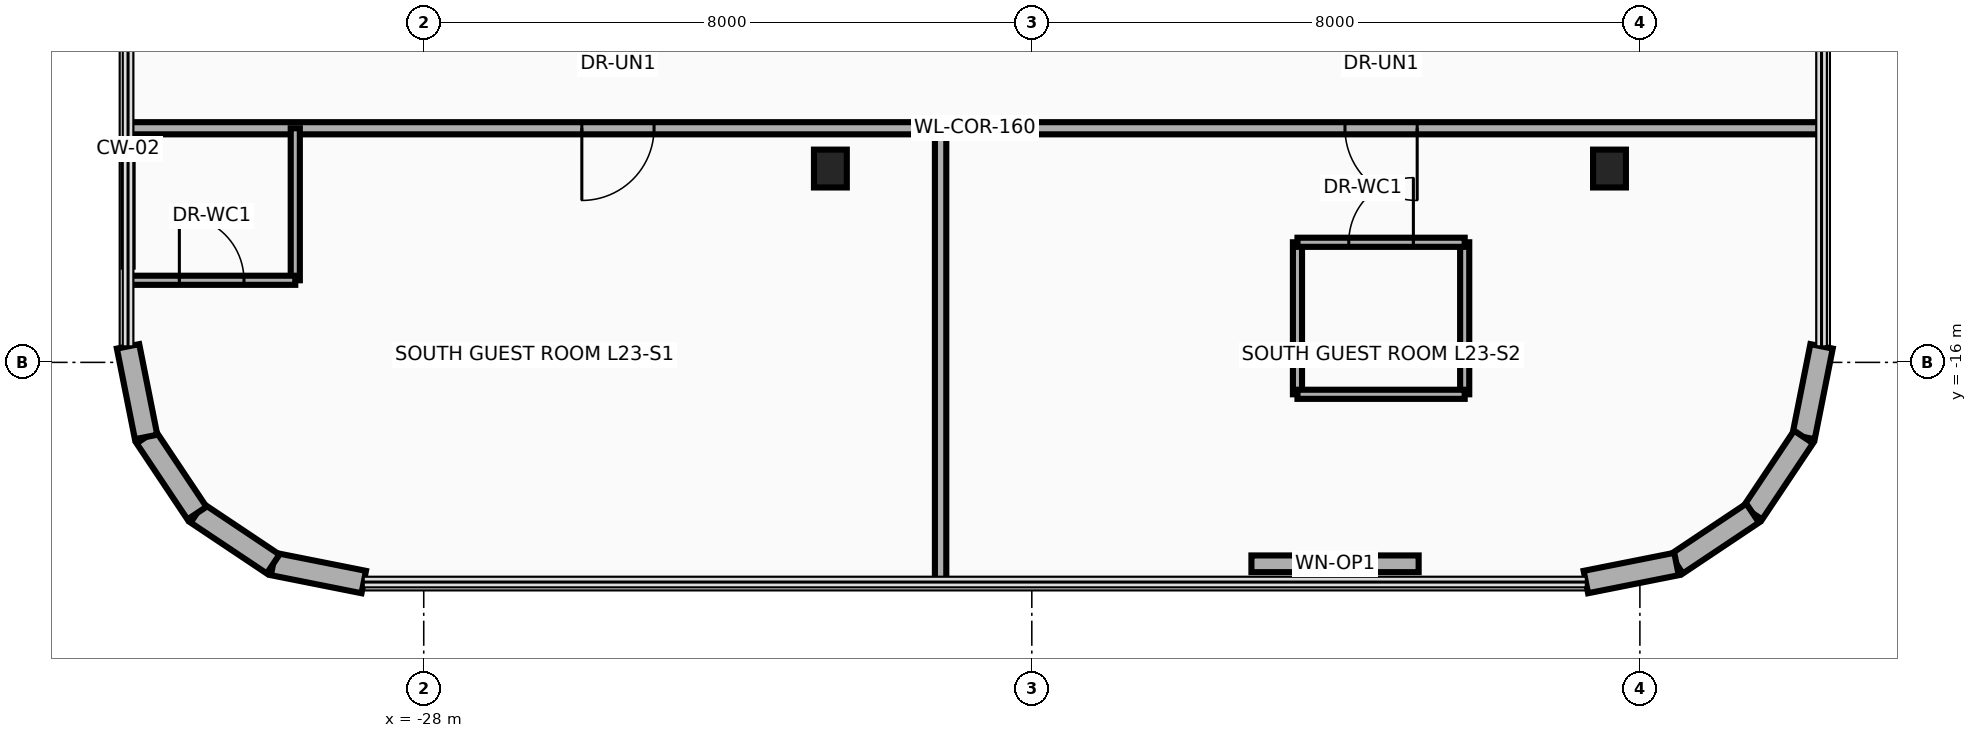
"""IFC4 building model, lengths in metres.
Left out: names, types, materials, properties, quantities, classifications, styles, units other than length and angle.
Written with IfcOpenShell. Run it as: python <this file> out.ifc"""

import sys

from ifc_helpers import new_model, si_unit, direction, frame, frame_2d, origin, origin_2d, place, context, subcontext, project, spatial, rectangle, i_section, extrude, source, transform, mapped, element, fill, save


model = new_model("IFC4")
c1 = context("Model", 3, precision=1e-05, world=origin(), true_north=direction((0.0, 1.0)))
c2 = subcontext(c1, "Body", "Model", "MODEL_VIEW")
j1 = project(units=[si_unit("LENGTHUNIT", "METRE"), si_unit("PLANEANGLEUNIT", "RADIAN")], contexts=[c1])
p1 = place(None, origin())
s1 = spatial("IfcSite", under=j1, at=p1, CompositionType="ELEMENT")
p2 = place(p1, origin())
s2 = spatial("IfcBuilding", under=s1, at=p2, CompositionType="ELEMENT")
p3 = place(p2, frame((0.0, 0.0, 92.6)))
s3 = spatial("IfcBuildingStorey", under=s2, at=p3, CompositionType="ELEMENT", Elevation=92.6)
m1 = source(origin(), c2, "Body", "SweptSolid", [
    extrude(i_section(OverallWidth=0.432, OverallDepth=0.498, WebThickness=0.056, FlangeThickness=0.089, at=origin_2d()), origin(), (0.0, 0.0, 1.0), 3.7),
])
for number, where, z_axis, x_axis in (
    (1, (-22.65, -13.45, 0.0), (0.0, 0.0, 1.0), (1.0, 0.0, 0.0)),
    (2, (-12.4, -13.45, 0.0), (0.0, 0.0, 1.0), (1.0, 0.0, 0.0)),
):
    element("IfcColumn", number, at=place(p3, frame(where, z_axis=z_axis, x_axis=x_axis)), inside=s3, PredefinedType="COLUMN", context=c2, shape_type="MappedRepresentation", body=[
        mapped(m1, transform((0.0, 0.0, 0.0), x_axis=(1.0, 0.0, 0.0), y_axis=(0.0, 1.0, 0.0), z_axis=(0.0, 0.0, 1.0), scale=1.0)),
    ])
p4 = place(p3, frame((-9.61, -15.789, 0.0), z_axis=(0.0, 0.0, 1.0), x_axis=(-0.194996050505, -0.980804027463, 0.0)))
e3 = element("IfcWall", 3, at=p4, inside=s3, PredefinedType="SOLIDWALL", context=c2, shape_type="SweptSolid", body=[
    extrude(rectangle(XDim=1.216, YDim=0.3, at=frame_2d((0.608, 0.0))), origin(), (0.0, 0.0, 1.0), 3.46),
])
for number, where, z_axis, x_axis in (
    (4, (-9.847, -16.982, 0.0), (0.0, 0.0, 1.0), (-0.556, -0.831, 0.0)),
    (5, (-10.517, -17.983, 0.0), (0.0, 0.0, 1.0), (-0.831, -0.556, 0.0)),
):
    element("IfcWall", number, at=place(p3, frame(where, z_axis=z_axis, x_axis=x_axis)), inside=s3, PredefinedType="SOLIDWALL", context=c2, shape_type="SweptSolid", body=[
        extrude(rectangle(XDim=1.205, YDim=0.3, at=frame_2d((0.603, 0.0))), origin(), (0.0, 0.0, 1.0), 3.46),
    ])
p5 = place(p3, frame((-11.518, -18.653, 0.0), z_axis=(0.0, 0.0, 1.0), x_axis=(-0.980804027463, -0.194996050505, 0.0)))
e6 = element("IfcWall", 6, at=p5, inside=s3, PredefinedType="SOLIDWALL", context=c2, shape_type="SweptSolid", body=[
    extrude(rectangle(XDim=1.216, YDim=0.3, at=frame_2d((0.608, 0.0))), origin(), (0.0, 0.0, 1.0), 3.46),
])
p6 = place(p3, frame((-14.911, -18.65, 0.0), z_axis=(0.0, 0.0, 1.0), x_axis=(-1.0, 0.0, 0.0)))
e7 = element("IfcWall", 7, at=p6, inside=s3, PredefinedType="SOLIDWALL", context=c2, shape_type="SweptSolid", body=[
    extrude(rectangle(XDim=2.2, YDim=0.22, at=frame_2d((1.1, 0.0))), origin(), (0.0, 0.0, 1.0), 3.46),
])
p7 = place(p6, frame((0.65, 0.0, 0.95)))
e8 = element("IfcOpeningElement", 8, at=p7, cuts=e7, PredefinedType="OPENING", context=c2, shape_type="SweptSolid", body=[
    extrude(rectangle(XDim=0.9, YDim=1.3, at=frame_2d((0.45, 0.65))), frame((0.0, 0.125, 0.0), z_axis=(0.0, -1.0, 0.0), x_axis=(1.0, 0.0, 0.0)), (0.0, 0.0, 1.0), 0.25),
])
p8 = place(p3, frame((-28.789, -18.89, 0.0), z_axis=(0.0, 0.0, 1.0), x_axis=(-0.980804027463, 0.194996050505, 0.0)))
e9 = element("IfcWall", 9, at=p8, inside=s3, PredefinedType="SOLIDWALL", context=c2, shape_type="SweptSolid", body=[
    extrude(rectangle(XDim=1.216, YDim=0.3, at=frame_2d((0.608, 0.0))), origin(), (0.0, 0.0, 1.0), 3.46),
])
for number, where, z_axis, x_axis in (
    (10, (-29.982, -18.653, 0.0), (0.0, 0.0, 1.0), (-0.831, 0.556, 0.0)),
    (11, (-30.983, -17.983, 0.0), (0.0, 0.0, 1.0), (-0.556, 0.831, 0.0)),
):
    element("IfcWall", number, at=place(p3, frame(where, z_axis=z_axis, x_axis=x_axis)), inside=s3, PredefinedType="SOLIDWALL", context=c2, shape_type="SweptSolid", body=[
        extrude(rectangle(XDim=1.205, YDim=0.3, at=frame_2d((0.603, 0.0))), origin(), (0.0, 0.0, 1.0), 3.46),
    ])
p9 = place(p3, frame((-31.653, -16.982, 0.0), z_axis=(0.0, 0.0, 1.0), x_axis=(-0.194996050505, 0.980804027463, 0.0)))
e12 = element("IfcWall", 12, at=p9, inside=s3, PredefinedType="SOLIDWALL", context=c2, shape_type="SweptSolid", body=[
    extrude(rectangle(XDim=1.216, YDim=0.3, at=frame_2d((0.608, 0.0))), origin(), (0.0, 0.0, 1.0), 3.46),
])
p10 = place(p3, frame((-31.89, -12.92, 0.0), z_axis=(0.0, 0.0, 1.0), x_axis=(1.0, 0.0, 0.0)))
e13 = element("IfcWall", 13, at=p10, inside=s3, PredefinedType="PARTITIONING", context=c2, shape_type="SweptSolid", body=[
    extrude(rectangle(XDim=22.28, YDim=0.16, at=frame_2d((11.14, 0.0))), origin(), (0.0, 0.0, 1.0), 2.834),
])
p11 = place(p10, frame((5.97, 0.0, 0.0)))
e14 = element("IfcOpeningElement", 14, at=p11, cuts=e13, PredefinedType="OPENING", context=c2, shape_type="SweptSolid", body=[
    extrude(rectangle(XDim=0.95, YDim=2.15, at=frame_2d((0.475, 1.075))), frame((0.0, 0.095, 0.0), z_axis=(0.0, -1.0, 0.0), x_axis=(1.0, 0.0, 0.0)), (0.0, 0.0, 1.0), 0.19),
])
p12 = place(p10, frame((16.01, 0.0, 0.0)))
e15 = element("IfcOpeningElement", 15, at=p12, cuts=e13, PredefinedType="OPENING", context=c2, shape_type="SweptSolid", body=[
    extrude(rectangle(XDim=0.95, YDim=2.15, at=frame_2d((0.475, 1.075))), frame((0.0, 0.095, 0.0), z_axis=(0.0, -1.0, 0.0), x_axis=(1.0, 0.0, 0.0)), (0.0, 0.0, 1.0), 0.19),
])
p13 = place(p3, frame((-21.2, -18.89, 0.0), z_axis=(0.0, 0.0, 1.0), x_axis=(0.0, 1.0, 0.0)))
e16 = element("IfcWall", 16, at=p13, inside=s3, PredefinedType="PARTITIONING", context=c2, shape_type="SweptSolid", body=[
    extrude(rectangle(XDim=5.97, YDim=0.15, at=frame_2d((2.985, 0.0))), origin(), (0.0, 0.0, 1.0), 2.896),
])
p14 = place(p3, frame((-29.69, -14.92, 0.0), z_axis=(0.0, 0.0, 1.0), x_axis=(0.0, 1.0, 0.0)))
e17 = element("IfcWall", 17, at=p14, inside=s3, PredefinedType="PARTITIONING", context=c2, shape_type="SweptSolid", body=[
    extrude(rectangle(XDim=2.0, YDim=0.12, at=frame_2d((1.0, 0.0))), origin(), (0.0, 0.0, 1.0), 3.46),
])
p15 = place(p3, frame((-31.89, -14.92, 0.0), z_axis=(0.0, 0.0, 1.0), x_axis=(1.0, 0.0, 0.0)))
e18 = element("IfcWall", 18, at=p15, inside=s3, PredefinedType="PARTITIONING", context=c2, shape_type="SweptSolid", body=[
    extrude(rectangle(XDim=2.2, YDim=0.12, at=frame_2d((1.1, 0.0))), origin(), (0.0, 0.0, 1.0), 3.46),
])
p16 = place(p15, frame((0.675, 0.0, 0.0)))
e19 = element("IfcOpeningElement", 19, at=p16, cuts=e18, PredefinedType="OPENING", context=c2, shape_type="SweptSolid", body=[
    extrude(rectangle(XDim=0.85, YDim=2.1, at=frame_2d((0.425, 1.05))), frame((0.0, 0.075, 0.0), z_axis=(0.0, -1.0, 0.0), x_axis=(1.0, 0.0, 0.0)), (0.0, 0.0, 1.0), 0.15),
])
p17 = place(p3, frame((-31.89, -14.74, 0.0), z_axis=(0.0, 0.0, 1.0), x_axis=(0.0, 1.0, 0.0)))
e20 = element("IfcWall", 20, at=p17, inside=s3, PredefinedType="PARTITIONING", context=c2, shape_type="SweptSolid", body=[
    extrude(rectangle(XDim=1.62, YDim=0.12, at=frame_2d((0.81, 0.0))), origin(), (0.0, 0.0, 1.0), 3.46),
])
for number, where, z_axis, x_axis in (
    (21, (-16.505, -16.42, 0.0), (0.0, 0.0, 1.0), (0.0, 1.0, 0.0)),
    (22, (-14.305, -16.42, 0.0), (0.0, 0.0, 1.0), (0.0, 1.0, 0.0)),
):
    element("IfcWall", number, at=place(p3, frame(where, z_axis=z_axis, x_axis=x_axis)), inside=s3, PredefinedType="PARTITIONING", context=c2, shape_type="SweptSolid", body=[
        extrude(rectangle(XDim=2.0, YDim=0.12, at=frame_2d((1.0, 0.0))), origin(), (0.0, 0.0, 1.0), 3.46),
    ])
p18 = place(p3, frame((-16.505, -16.42, 0.0), z_axis=(0.0, 0.0, 1.0), x_axis=(1.0, 0.0, 0.0)))
e23 = element("IfcWall", 23, at=p18, inside=s3, PredefinedType="PARTITIONING", context=c2, shape_type="SweptSolid", body=[
    extrude(rectangle(XDim=2.2, YDim=0.12, at=frame_2d((1.1, 0.0))), origin(), (0.0, 0.0, 1.0), 3.46),
])
p19 = place(p3, frame((-16.505, -14.42, 0.0), z_axis=(0.0, 0.0, 1.0), x_axis=(1.0, 0.0, 0.0)))
e24 = element("IfcWall", 24, at=p19, inside=s3, PredefinedType="PARTITIONING", context=c2, shape_type="SweptSolid", body=[
    extrude(rectangle(XDim=2.2, YDim=0.12, at=frame_2d((1.1, 0.0))), origin(), (0.0, 0.0, 1.0), 3.46),
])
p20 = place(p19, frame((0.675, 0.0, 0.0)))
e25 = element("IfcOpeningElement", 25, at=p20, cuts=e24, PredefinedType="OPENING", context=c2, shape_type="SweptSolid", body=[
    extrude(rectangle(XDim=0.85, YDim=2.1, at=frame_2d((0.425, 1.05))), frame((0.0, 0.075, 0.0), z_axis=(0.0, -1.0, 0.0), x_axis=(1.0, 0.0, 0.0)), (0.0, 0.0, 1.0), 0.15),
])
p21 = place(p7, origin())
e26 = element("IfcWindow", 26, at=p21, inside=s3, PartitioningType="SINGLE_PANEL", PredefinedType="WINDOW", context=c2, shape_type="SweptSolid", body=[
    extrude(rectangle(XDim=0.9, YDim=1.3, at=frame_2d((0.45, 0.65))), frame((0.0, 0.03, 0.0), z_axis=(0.0, -1.0, 0.0), x_axis=(1.0, 0.0, 0.0)), (0.0, 0.0, 1.0), 0.06),
])
fill(e8, e26)
p22 = place(p11, frame((0.95, 0.0, 0.0), z_axis=(0.0, 0.0, 1.0), x_axis=(-1.0, 0.0, 0.0)))
e27 = element("IfcDoor", 27, at=p22, inside=s3, OperationType="SINGLE_SWING_LEFT", PredefinedType="DOOR", context=c2, shape_type="SweptSolid", body=[
    extrude(rectangle(XDim=0.95, YDim=2.15, at=frame_2d((0.475, 1.075))), frame((0.0, 0.025, 0.0), z_axis=(0.0, -1.0, 0.0), x_axis=(1.0, 0.0, 0.0)), (0.0, 0.0, 1.0), 0.05),
])
fill(e14, e27)
p23 = place(p16, origin())
e28 = element("IfcDoor", 28, at=p23, inside=s3, OperationType="SINGLE_SWING_RIGHT", PredefinedType="DOOR", context=c2, shape_type="SweptSolid", body=[
    extrude(rectangle(XDim=0.85, YDim=2.1, at=frame_2d((0.425, 1.05))), frame((0.0, 0.025, 0.0), z_axis=(0.0, -1.0, 0.0), x_axis=(1.0, 0.0, 0.0)), (0.0, 0.0, 1.0), 0.05),
])
fill(e19, e28)
p24 = place(p12, frame((0.95, 0.0, 0.0), z_axis=(0.0, 0.0, 1.0), x_axis=(-1.0, 0.0, 0.0)))
e29 = element("IfcDoor", 29, at=p24, inside=s3, OperationType="SINGLE_SWING_LEFT", PredefinedType="DOOR", context=c2, shape_type="SweptSolid", body=[
    extrude(rectangle(XDim=0.95, YDim=2.15, at=frame_2d((0.475, 1.075))), frame((0.0, 0.025, 0.0), z_axis=(0.0, -1.0, 0.0), x_axis=(1.0, 0.0, 0.0)), (0.0, 0.0, 1.0), 0.05),
])
fill(e15, e29)
p25 = place(p20, origin())
e30 = element("IfcDoor", 30, at=p25, inside=s3, OperationType="SINGLE_SWING_RIGHT", PredefinedType="DOOR", context=c2, shape_type="SweptSolid", body=[
    extrude(rectangle(XDim=0.85, YDim=2.1, at=frame_2d((0.425, 1.05))), frame((0.0, 0.025, 0.0), z_axis=(0.0, -1.0, 0.0), x_axis=(1.0, 0.0, 0.0)), (0.0, 0.0, 1.0), 0.05),
])
fill(e25, e30)
save(model, sys.argv[1])
